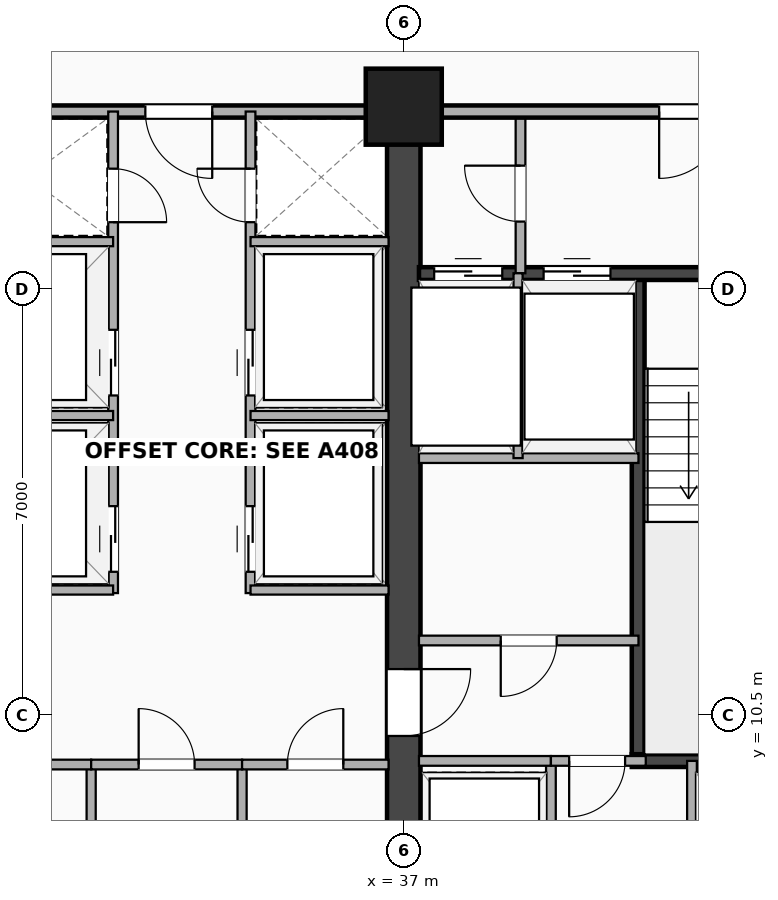
"""IFC4 building model, lengths in metres.
Left out: names, types, materials, properties, quantities, classifications, styles, units other than length and angle.
Written with IfcOpenShell. Run it as: python <this file> out.ifc"""

import sys

from ifc_helpers import new_model, si_unit, direction, frame, frame_2d, origin, origin_2d, place, context, subcontext, project, spatial, rectangle, extrude, element, fill, save


model = new_model("IFC4")
c1 = context("Model", 3, precision=1e-05, world=origin(), true_north=direction((0.0, 1.0)))
c2 = subcontext(c1, "Body", "Model", "MODEL_VIEW")
j1 = project(units=[si_unit("LENGTHUNIT", "METRE"), si_unit("PLANEANGLEUNIT", "RADIAN")], contexts=[c1])
p1 = place(None, origin())
s1 = spatial("IfcSite", under=j1, at=p1, CompositionType="ELEMENT")
p2 = place(p1, origin())
s2 = spatial("IfcBuilding", under=s1, at=p2, CompositionType="ELEMENT")
p3 = place(p2, frame((0.0, 0.0, 98.7)))
s3 = spatial("IfcBuildingStorey", under=s2, at=p3, CompositionType="ELEMENT", Elevation=98.7)
p4 = place(p3, frame((37.0, 3.5, 0.0), z_axis=(0.0, 0.0, 1.0), x_axis=(0.0, 1.0, 0.0)))
e1 = element("IfcWall", 1, at=p4, inside=s3, PredefinedType="SHEAR", context=c2, shape_type="SweptSolid", body=[
    extrude(rectangle(XDim=16.9, YDim=0.55, at=frame_2d((8.45, 0.0))), origin(), (0.0, 0.0, 1.0), 3.24),
])
p5 = place(p4, frame((6.65, 0.0, 0.0)))
e2 = element("IfcOpeningElement", 2, at=p5, cuts=e1, PredefinedType="OPENING", context=c2, shape_type="SweptSolid", body=[
    extrude(rectangle(XDim=1.1, YDim=2.15, at=frame_2d((0.55, 1.075))), frame((0.0, 0.285, 0.0), z_axis=(0.0, -1.0, 0.0), x_axis=(1.0, 0.0, 0.0)), (0.0, 0.0, 1.0), 0.57),
])
p6 = place(p3, frame((40.855, 9.745, 0.0), z_axis=(0.0, 0.0, 1.0), x_axis=(0.0, 1.0, 0.0)))
e3 = element("IfcWall", 3, at=p6, inside=s3, PredefinedType="SHEAR", context=c2, shape_type="SweptSolid", body=[
    extrude(rectangle(XDim=8.01, YDim=0.21, at=frame_2d((4.005, 0.0))), origin(), (0.0, 0.0, 1.0), 3.24),
])
p7 = place(p3, frame((40.75, 9.745, 0.0), z_axis=(0.0, 0.0, 1.0), x_axis=(1.0, 0.0, 0.0)))
e4 = element("IfcWall", 4, at=p7, inside=s3, PredefinedType="SHEAR", context=c2, shape_type="SweptSolid", body=[
    extrude(rectangle(XDim=3.66, YDim=0.21, at=frame_2d((1.83, 0.0))), origin(), (0.0, 0.0, 1.0), 3.24),
])
p8 = place(p3, frame((37.25, 17.755, 0.0), z_axis=(0.0, 0.0, 1.0), x_axis=(1.0, 0.0, 0.0)))
e5 = element("IfcWall", 5, at=p8, inside=s3, PredefinedType="SHEAR", context=c2, shape_type="SweptSolid", body=[
    extrude(rectangle(XDim=7.2, YDim=0.21, at=frame_2d((3.6, 0.0))), origin(), (0.0, 0.0, 1.0), 3.24),
])
p9 = place(p8, frame((0.25, 0.0, 0.0)))
e6 = element("IfcOpeningElement", 6, at=p9, cuts=e5, PredefinedType="OPENING", context=c2, shape_type="SweptSolid", body=[
    extrude(rectangle(XDim=1.12, YDim=2.2, at=frame_2d((0.56, 1.1))), frame((0.0, 0.115, 0.0), z_axis=(0.0, -1.0, 0.0), x_axis=(1.0, 0.0, 0.0)), (0.0, 0.0, 1.0), 0.23),
])
p10 = place(p8, frame((2.05, 0.0, 0.0)))
e7 = element("IfcOpeningElement", 7, at=p10, cuts=e5, PredefinedType="OPENING", context=c2, shape_type="SweptSolid", body=[
    extrude(rectangle(XDim=1.1, YDim=2.18, at=frame_2d((0.55, 1.09))), frame((0.0, 0.115, 0.0), z_axis=(0.0, -1.0, 0.0), x_axis=(1.0, 0.0, 0.0)), (0.0, 0.0, 1.0), 0.23),
])
p11 = place(p8, frame((5.78, 0.0, 0.0), z_axis=(0.0, 0.0, 1.0), x_axis=(-1.0, 0.0, 0.0)))
e8 = element("IfcOpeningElement", 8, at=p11, cuts=e5, PredefinedType="OPENING", context=c2, shape_type="SweptSolid", body=[
    extrude(rectangle(XDim=1.05, YDim=2.15, at=frame_2d((0.525, 1.075))), frame((0.0, 0.115, 0.0), z_axis=(0.0, -1.0, 0.0), x_axis=(1.0, 0.0, 0.0)), (0.0, 0.0, 1.0), 0.23),
])
p12 = place(p3, frame((37.0, 20.5, -0.26), z_axis=(0.0, 0.0, 1.0), x_axis=(1.0, 0.0, 0.0)))
e9 = element("IfcColumn", 9, at=p12, inside=s3, PredefinedType="COLUMN", context=c2, shape_type="SweptSolid", body=[
    extrude(rectangle(XDim=1.25, YDim=1.25, at=origin_2d()), origin(), (0.0, 0.0, 1.0), 3.5),
])
p13 = place(p3, frame((38.92, 17.76, 0.0), z_axis=(0.0, 0.0, 1.0), x_axis=(0.0, 1.0, 0.0)))
e10 = element("IfcWall", 10, at=p13, inside=s3, PredefinedType="PARTITIONING", context=c2, shape_type="SweptSolid", body=[
    extrude(rectangle(XDim=2.66, YDim=0.16, at=frame_2d((1.33, 0.0))), origin(), (0.0, 0.0, 1.0), 2.614),
])
p14 = place(p13, frame((1.77, 0.0, 0.0), z_axis=(0.0, 0.0, 1.0), x_axis=(-1.0, 0.0, 0.0)))
e11 = element("IfcOpeningElement", 11, at=p14, cuts=e10, PredefinedType="OPENING", context=c2, shape_type="SweptSolid", body=[
    extrude(rectangle(XDim=0.92, YDim=2.08, at=frame_2d((0.46, 1.04))), frame((0.0, 0.09, 0.0), z_axis=(0.0, -1.0, 0.0), x_axis=(1.0, 0.0, 0.0)), (0.0, 0.0, 1.0), 0.18),
])
p15 = place(p3, frame((37.25, 14.72, 0.0), z_axis=(0.0, 0.0, 1.0), x_axis=(1.0, 0.0, 0.0)))
e12 = element("IfcWall", 12, at=p15, inside=s3, PredefinedType="PARTITIONING", context=c2, shape_type="SweptSolid", body=[
    extrude(rectangle(XDim=3.61, YDim=0.16, at=frame_2d((1.805, 0.0))), origin(), (0.0, 0.0, 1.0), 3.24),
])
p16 = place(p3, frame((38.88, 14.72, 0.0), z_axis=(0.0, 0.0, 1.0), x_axis=(0.0, 1.0, 0.0)))
e13 = element("IfcWall", 13, at=p16, inside=s3, PredefinedType="PARTITIONING", context=c2, shape_type="SweptSolid", body=[
    extrude(rectangle(XDim=3.04, YDim=0.15, at=frame_2d((1.52, 0.0))), origin(), (0.0, 0.0, 1.0), 3.24),
])
p17 = place(p3, frame((29.2, 20.42, 0.0), z_axis=(0.0, 0.0, 1.0), x_axis=(1.0, 0.0, 0.0)))
e14 = element("IfcWall", 14, at=p17, inside=s3, PredefinedType="PARTITIONING", context=c2, shape_type="SweptSolid", body=[
    extrude(rectangle(XDim=7.8, YDim=0.2, at=frame_2d((3.9, 0.0))), origin(), (0.0, 0.0, 1.0), 2.313),
])
p18 = place(p17, frame((3.55, 0.0, 0.0)))
e15 = element("IfcOpeningElement", 15, at=p18, cuts=e14, PredefinedType="OPENING", context=c2, shape_type="SweptSolid", body=[
    extrude(rectangle(XDim=1.1, YDim=2.15, at=frame_2d((0.55, 1.075))), frame((0.0, 0.11, 0.0), z_axis=(0.0, -1.0, 0.0), x_axis=(1.0, 0.0, 0.0)), (0.0, 0.0, 1.0), 0.22),
])
p19 = place(p3, frame((37.0, 20.42, 0.0), z_axis=(0.0, 0.0, 1.0), x_axis=(1.0, 0.0, 0.0)))
e16 = element("IfcWall", 16, at=p19, inside=s3, PredefinedType="PARTITIONING", context=c2, shape_type="SweptSolid", body=[
    extrude(rectangle(XDim=7.45, YDim=0.2, at=frame_2d((3.725, 0.0))), origin(), (0.0, 0.0, 1.0), 2.313),
])
p20 = place(p19, frame((4.2, 0.0, 0.0)))
e17 = element("IfcOpeningElement", 17, at=p20, cuts=e16, PredefinedType="OPENING", context=c2, shape_type="SweptSolid", body=[
    extrude(rectangle(XDim=1.1, YDim=2.15, at=frame_2d((0.55, 1.075))), frame((0.0, 0.11, 0.0), z_axis=(0.0, -1.0, 0.0), x_axis=(1.0, 0.0, 0.0)), (0.0, 0.0, 1.0), 0.22),
])
p21 = place(p3, frame((37.25, 11.72, 0.0), z_axis=(0.0, 0.0, 1.0), x_axis=(1.0, 0.0, 0.0)))
e18 = element("IfcWall", 18, at=p21, inside=s3, PredefinedType="PARTITIONING", context=c2, shape_type="SweptSolid", body=[
    extrude(rectangle(XDim=3.61, YDim=0.16, at=frame_2d((1.805, 0.0))), origin(), (0.0, 0.0, 1.0), 3.24),
])
p22 = place(p21, frame((1.345, 0.0, 0.0)))
e19 = element("IfcOpeningElement", 19, at=p22, cuts=e18, PredefinedType="OPENING", context=c2, shape_type="SweptSolid", body=[
    extrude(rectangle(XDim=0.92, YDim=2.08, at=frame_2d((0.46, 1.04))), frame((0.0, 0.09, 0.0), z_axis=(0.0, -1.0, 0.0), x_axis=(1.0, 0.0, 0.0)), (0.0, 0.0, 1.0), 0.18),
])
for number, where, z_axis, x_axis in (
    (20, (39.42, 3.9, 0.0), (0.0, 0.0, 1.0), (0.0, 1.0, 0.0)),
    (21, (41.74, 3.9, 0.0), (0.0, 0.0, 1.0), (0.0, 1.0, 0.0)),
):
    element("IfcWall", number, at=place(p3, frame(where, z_axis=z_axis, x_axis=x_axis)), inside=s3, PredefinedType="PARTITIONING", context=c2, shape_type="SweptSolid", body=[
        extrude(rectangle(XDim=5.84, YDim=0.16, at=frame_2d((2.92, 0.0))), origin(), (0.0, 0.0, 1.0), 3.24),
    ])
p23 = place(p3, frame((37.25, 9.74, 0.0), z_axis=(0.0, 0.0, 1.0), x_axis=(1.0, 0.0, 0.0)))
e22 = element("IfcWall", 22, at=p23, inside=s3, PredefinedType="PARTITIONING", context=c2, shape_type="SweptSolid", body=[
    extrude(rectangle(XDim=2.17, YDim=0.16, at=frame_2d((1.085, 0.0))), origin(), (0.0, 0.0, 1.0), 3.24),
])
p24 = place(p3, frame((39.42, 9.74, 0.0), z_axis=(0.0, 0.0, 1.0), x_axis=(1.0, 0.0, 0.0)))
e23 = element("IfcWall", 23, at=p24, inside=s3, PredefinedType="PARTITIONING", context=c2, shape_type="SweptSolid", body=[
    extrude(rectangle(XDim=1.56, YDim=0.16, at=frame_2d((0.78, 0.0))), origin(), (0.0, 0.0, 1.0), 3.24),
])
p25 = place(p24, frame((0.3, 0.0, 0.0)))
e24 = element("IfcOpeningElement", 24, at=p25, cuts=e23, PredefinedType="OPENING", context=c2, shape_type="SweptSolid", body=[
    extrude(rectangle(XDim=0.92, YDim=2.08, at=frame_2d((0.46, 1.04))), frame((0.0, 0.09, 0.0), z_axis=(0.0, -1.0, 0.0), x_axis=(1.0, 0.0, 0.0)), (0.0, 0.0, 1.0), 0.18),
])
p26 = place(p3, frame((31.859, 3.95, 0.0), z_axis=(0.0, 0.0, 1.0), x_axis=(0.0, 1.0, 0.0)))
e25 = element("IfcWall", 25, at=p26, inside=s3, PredefinedType="PARTITIONING", context=c2, shape_type="SweptSolid", body=[
    extrude(rectangle(XDim=5.73, YDim=0.15, at=frame_2d((2.865, 0.0))), origin(), (0.0, 0.0, 1.0), 3.24),
])
p27 = place(p3, frame((29.45, 9.68, 0.0), z_axis=(0.0, 0.0, 1.0), x_axis=(1.0, 0.0, 0.0)))
e26 = element("IfcWall", 26, at=p27, inside=s3, PredefinedType="PARTITIONING", context=c2, shape_type="SweptSolid", body=[
    extrude(rectangle(XDim=2.409, YDim=0.16, at=frame_2d((1.205, 0.0))), origin(), (0.0, 0.0, 1.0), 3.24),
])
p28 = place(p27, frame((1.664, 0.0, 0.0), z_axis=(0.0, 0.0, 1.0), x_axis=(-1.0, 0.0, 0.0)))
e27 = element("IfcOpeningElement", 27, at=p28, cuts=e26, PredefinedType="OPENING", context=c2, shape_type="SweptSolid", body=[
    extrude(rectangle(XDim=0.92, YDim=2.08, at=frame_2d((0.46, 1.04))), frame((0.0, 0.09, 0.0), z_axis=(0.0, -1.0, 0.0), x_axis=(1.0, 0.0, 0.0)), (0.0, 0.0, 1.0), 0.18),
])
p29 = place(p3, frame((34.341, 3.95, 0.0), z_axis=(0.0, 0.0, 1.0), x_axis=(0.0, 1.0, 0.0)))
e28 = element("IfcWall", 28, at=p29, inside=s3, PredefinedType="PARTITIONING", context=c2, shape_type="SweptSolid", body=[
    extrude(rectangle(XDim=5.73, YDim=0.15, at=frame_2d((2.865, 0.0))), origin(), (0.0, 0.0, 1.0), 3.24),
])
p30 = place(p3, frame((31.859, 9.68, 0.0), z_axis=(0.0, 0.0, 1.0), x_axis=(1.0, 0.0, 0.0)))
e29 = element("IfcWall", 29, at=p30, inside=s3, PredefinedType="PARTITIONING", context=c2, shape_type="SweptSolid", body=[
    extrude(rectangle(XDim=2.482, YDim=0.16, at=frame_2d((1.241, 0.0))), origin(), (0.0, 0.0, 1.0), 3.24),
])
p31 = place(p30, frame((1.701, 0.0, 0.0), z_axis=(0.0, 0.0, 1.0), x_axis=(-1.0, 0.0, 0.0)))
e30 = element("IfcOpeningElement", 30, at=p31, cuts=e29, PredefinedType="OPENING", context=c2, shape_type="SweptSolid", body=[
    extrude(rectangle(XDim=0.92, YDim=2.08, at=frame_2d((0.46, 1.04))), frame((0.0, 0.09, 0.0), z_axis=(0.0, -1.0, 0.0), x_axis=(1.0, 0.0, 0.0)), (0.0, 0.0, 1.0), 0.18),
])
p32 = place(p3, frame((34.341, 9.68, 0.0), z_axis=(0.0, 0.0, 1.0), x_axis=(1.0, 0.0, 0.0)))
e31 = element("IfcWall", 31, at=p32, inside=s3, PredefinedType="PARTITIONING", context=c2, shape_type="SweptSolid", body=[
    extrude(rectangle(XDim=2.409, YDim=0.16, at=frame_2d((1.205, 0.0))), origin(), (0.0, 0.0, 1.0), 3.24),
])
p33 = place(p32, frame((1.664, 0.0, 0.0), z_axis=(0.0, 0.0, 1.0), x_axis=(-1.0, 0.0, 0.0)))
e32 = element("IfcOpeningElement", 32, at=p33, cuts=e31, PredefinedType="OPENING", context=c2, shape_type="SweptSolid", body=[
    extrude(rectangle(XDim=0.92, YDim=2.08, at=frame_2d((0.46, 1.04))), frame((0.0, 0.09, 0.0), z_axis=(0.0, -1.0, 0.0), x_axis=(1.0, 0.0, 0.0)), (0.0, 0.0, 1.0), 0.18),
])
p34 = place(p3, frame((32.22, 12.5, 0.0), z_axis=(0.0, 0.0, 1.0), x_axis=(0.0, 1.0, 0.0)))
e33 = element("IfcWall", 33, at=p34, inside=s3, PredefinedType="PARTITIONING", context=c2, shape_type="SweptSolid", body=[
    extrude(rectangle(XDim=7.92, YDim=0.16, at=frame_2d((3.96, 0.0))), origin(), (0.0, 0.0, 1.0), 2.614),
])
p35 = place(p34, frame((1.43, 0.0, 0.0), z_axis=(0.0, 0.0, 1.0), x_axis=(-1.0, 0.0, 0.0)))
e34 = element("IfcOpeningElement", 34, at=p35, cuts=e33, PredefinedType="OPENING", context=c2, shape_type="SweptSolid", body=[
    extrude(rectangle(XDim=1.08, YDim=2.16, at=frame_2d((0.54, 1.08))), frame((0.0, 0.09, 0.0), z_axis=(0.0, -1.0, 0.0), x_axis=(1.0, 0.0, 0.0)), (0.0, 0.0, 1.0), 0.18),
])
p36 = place(p34, frame((4.33, 0.0, 0.0), z_axis=(0.0, 0.0, 1.0), x_axis=(-1.0, 0.0, 0.0)))
e35 = element("IfcOpeningElement", 35, at=p36, cuts=e33, PredefinedType="OPENING", context=c2, shape_type="SweptSolid", body=[
    extrude(rectangle(XDim=1.08, YDim=2.16, at=frame_2d((0.54, 1.08))), frame((0.0, 0.09, 0.0), z_axis=(0.0, -1.0, 0.0), x_axis=(1.0, 0.0, 0.0)), (0.0, 0.0, 1.0), 0.18),
])
p37 = place(p34, frame((6.1, 0.0, 0.0)))
e36 = element("IfcOpeningElement", 36, at=p37, cuts=e33, PredefinedType="OPENING", context=c2, shape_type="SweptSolid", body=[
    extrude(rectangle(XDim=0.88, YDim=2.08, at=frame_2d((0.44, 1.04))), frame((0.0, 0.09, 0.0), z_axis=(0.0, -1.0, 0.0), x_axis=(1.0, 0.0, 0.0)), (0.0, 0.0, 1.0), 0.18),
])
p38 = place(p3, frame((34.48, 12.5, 0.0), z_axis=(0.0, 0.0, 1.0), x_axis=(0.0, 1.0, 0.0)))
e37 = element("IfcWall", 37, at=p38, inside=s3, PredefinedType="PARTITIONING", context=c2, shape_type="SweptSolid", body=[
    extrude(rectangle(XDim=7.92, YDim=0.16, at=frame_2d((3.96, 0.0))), origin(), (0.0, 0.0, 1.0), 2.614),
])
p39 = place(p38, frame((0.35, 0.0, 0.0)))
e38 = element("IfcOpeningElement", 38, at=p39, cuts=e37, PredefinedType="OPENING", context=c2, shape_type="SweptSolid", body=[
    extrude(rectangle(XDim=1.08, YDim=2.16, at=frame_2d((0.54, 1.08))), frame((0.0, 0.09, 0.0), z_axis=(0.0, -1.0, 0.0), x_axis=(1.0, 0.0, 0.0)), (0.0, 0.0, 1.0), 0.18),
])
p40 = place(p38, frame((3.25, 0.0, 0.0)))
e39 = element("IfcOpeningElement", 39, at=p40, cuts=e37, PredefinedType="OPENING", context=c2, shape_type="SweptSolid", body=[
    extrude(rectangle(XDim=1.08, YDim=2.16, at=frame_2d((0.54, 1.08))), frame((0.0, 0.09, 0.0), z_axis=(0.0, -1.0, 0.0), x_axis=(1.0, 0.0, 0.0)), (0.0, 0.0, 1.0), 0.18),
])
p41 = place(p38, frame((6.98, 0.0, 0.0), z_axis=(0.0, 0.0, 1.0), x_axis=(-1.0, 0.0, 0.0)))
e40 = element("IfcOpeningElement", 40, at=p41, cuts=e37, PredefinedType="OPENING", context=c2, shape_type="SweptSolid", body=[
    extrude(rectangle(XDim=0.88, YDim=2.08, at=frame_2d((0.44, 1.04))), frame((0.0, 0.09, 0.0), z_axis=(0.0, -1.0, 0.0), x_axis=(1.0, 0.0, 0.0)), (0.0, 0.0, 1.0), 0.18),
])
p42 = place(p3, frame((29.45, 12.55, 0.0), z_axis=(0.0, 0.0, 1.0), x_axis=(1.0, 0.0, 0.0)))
e41 = element("IfcWall", 41, at=p42, inside=s3, PredefinedType="PARTITIONING", context=c2, shape_type="SweptSolid", body=[
    extrude(rectangle(XDim=2.77, YDim=0.15, at=frame_2d((1.385, 0.0))), origin(), (0.0, 0.0, 1.0), 3.24),
])
p43 = place(p3, frame((34.48, 12.55, 0.0), z_axis=(0.0, 0.0, 1.0), x_axis=(1.0, 0.0, 0.0)))
e42 = element("IfcWall", 42, at=p43, inside=s3, PredefinedType="PARTITIONING", context=c2, shape_type="SweptSolid", body=[
    extrude(rectangle(XDim=2.27, YDim=0.15, at=frame_2d((1.135, 0.0))), origin(), (0.0, 0.0, 1.0), 3.24),
])
p44 = place(p3, frame((29.45, 15.42, 0.0), z_axis=(0.0, 0.0, 1.0), x_axis=(1.0, 0.0, 0.0)))
e43 = element("IfcWall", 43, at=p44, inside=s3, PredefinedType="PARTITIONING", context=c2, shape_type="SweptSolid", body=[
    extrude(rectangle(XDim=2.77, YDim=0.15, at=frame_2d((1.385, 0.0))), origin(), (0.0, 0.0, 1.0), 3.24),
])
p45 = place(p3, frame((34.48, 15.42, 0.0), z_axis=(0.0, 0.0, 1.0), x_axis=(1.0, 0.0, 0.0)))
e44 = element("IfcWall", 44, at=p45, inside=s3, PredefinedType="PARTITIONING", context=c2, shape_type="SweptSolid", body=[
    extrude(rectangle(XDim=2.27, YDim=0.15, at=frame_2d((1.135, 0.0))), origin(), (0.0, 0.0, 1.0), 3.24),
])
p46 = place(p3, frame((29.45, 18.28, 0.0), z_axis=(0.0, 0.0, 1.0), x_axis=(1.0, 0.0, 0.0)))
e45 = element("IfcWall", 45, at=p46, inside=s3, PredefinedType="PARTITIONING", context=c2, shape_type="SweptSolid", body=[
    extrude(rectangle(XDim=2.77, YDim=0.15, at=frame_2d((1.385, 0.0))), origin(), (0.0, 0.0, 1.0), 3.24),
])
p47 = place(p3, frame((34.48, 18.28, 0.0), z_axis=(0.0, 0.0, 1.0), x_axis=(1.0, 0.0, 0.0)))
e46 = element("IfcWall", 46, at=p47, inside=s3, PredefinedType="PARTITIONING", context=c2, shape_type="SweptSolid", body=[
    extrude(rectangle(XDim=2.27, YDim=0.15, at=frame_2d((1.135, 0.0))), origin(), (0.0, 0.0, 1.0), 3.24),
])
p48 = place(p9, origin())
e47 = element("IfcDoor", 47, at=p48, inside=s3, OperationType="DOUBLE_DOOR_SLIDING", PredefinedType="DOOR", context=c2, shape_type="SweptSolid", body=[
    extrude(rectangle(XDim=1.12, YDim=2.2, at=frame_2d((0.56, 1.1))), frame((0.0, 0.025, 0.0), z_axis=(0.0, -1.0, 0.0), x_axis=(1.0, 0.0, 0.0)), (0.0, 0.0, 1.0), 0.05),
])
fill(e6, e47)
p49 = place(p10, origin())
e48 = element("IfcDoor", 48, at=p49, inside=s3, OperationType="DOUBLE_DOOR_SLIDING", PredefinedType="DOOR", context=c2, shape_type="SweptSolid", body=[
    extrude(rectangle(XDim=1.1, YDim=2.18, at=frame_2d((0.55, 1.09))), frame((0.0, 0.025, 0.0), z_axis=(0.0, -1.0, 0.0), x_axis=(1.0, 0.0, 0.0)), (0.0, 0.0, 1.0), 0.05),
])
fill(e7, e48)
p50 = place(p5, origin())
e49 = element("IfcDoor", 49, at=p50, inside=s3, OperationType="SINGLE_SWING_RIGHT", PredefinedType="DOOR", context=c2, shape_type="SweptSolid", body=[
    extrude(rectangle(XDim=1.1, YDim=2.15, at=frame_2d((0.55, 1.075))), frame((0.0, 0.025, 0.0), z_axis=(0.0, -1.0, 0.0), x_axis=(1.0, 0.0, 0.0)), (0.0, 0.0, 1.0), 0.05),
])
fill(e2, e49)
p51 = place(p14, origin())
e50 = element("IfcDoor", 50, at=p51, inside=s3, OperationType="SINGLE_SWING_RIGHT", PredefinedType="DOOR", context=c2, shape_type="SweptSolid", body=[
    extrude(rectangle(XDim=0.92, YDim=2.08, at=frame_2d((0.46, 1.04))), frame((0.0, 0.025, 0.0), z_axis=(0.0, -1.0, 0.0), x_axis=(1.0, 0.0, 0.0)), (0.0, 0.0, 1.0), 0.05),
])
fill(e11, e50)
p52 = place(p18, origin())
e51 = element("IfcDoor", 51, at=p52, inside=s3, OperationType="SINGLE_SWING_RIGHT", PredefinedType="DOOR", context=c2, shape_type="SweptSolid", body=[
    extrude(rectangle(XDim=1.1, YDim=2.15, at=frame_2d((0.55, 1.075))), frame((0.0, 0.025, 0.0), z_axis=(0.0, -1.0, 0.0), x_axis=(1.0, 0.0, 0.0)), (0.0, 0.0, 1.0), 0.05),
])
fill(e15, e51)
p53 = place(p20, origin())
e52 = element("IfcDoor", 52, at=p53, inside=s3, OperationType="SINGLE_SWING_LEFT", PredefinedType="DOOR", context=c2, shape_type="SweptSolid", body=[
    extrude(rectangle(XDim=1.1, YDim=2.15, at=frame_2d((0.55, 1.075))), frame((0.0, 0.025, 0.0), z_axis=(0.0, -1.0, 0.0), x_axis=(1.0, 0.0, 0.0)), (0.0, 0.0, 1.0), 0.05),
])
fill(e17, e52)
p54 = place(p22, origin())
e53 = element("IfcDoor", 53, at=p54, inside=s3, OperationType="SINGLE_SWING_LEFT", PredefinedType="DOOR", context=c2, shape_type="SweptSolid", body=[
    extrude(rectangle(XDim=0.92, YDim=2.08, at=frame_2d((0.46, 1.04))), frame((0.0, 0.025, 0.0), z_axis=(0.0, -1.0, 0.0), x_axis=(1.0, 0.0, 0.0)), (0.0, 0.0, 1.0), 0.05),
])
fill(e19, e53)
p55 = place(p25, origin())
e54 = element("IfcDoor", 54, at=p55, inside=s3, OperationType="SINGLE_SWING_LEFT", PredefinedType="DOOR", context=c2, shape_type="SweptSolid", body=[
    extrude(rectangle(XDim=0.92, YDim=2.08, at=frame_2d((0.46, 1.04))), frame((0.0, 0.025, 0.0), z_axis=(0.0, -1.0, 0.0), x_axis=(1.0, 0.0, 0.0)), (0.0, 0.0, 1.0), 0.05),
])
fill(e24, e54)
p56 = place(p31, origin())
e55 = element("IfcDoor", 55, at=p56, inside=s3, OperationType="SINGLE_SWING_LEFT", PredefinedType="DOOR", context=c2, shape_type="SweptSolid", body=[
    extrude(rectangle(XDim=0.92, YDim=2.08, at=frame_2d((0.46, 1.04))), frame((0.0, 0.025, 0.0), z_axis=(0.0, -1.0, 0.0), x_axis=(1.0, 0.0, 0.0)), (0.0, 0.0, 1.0), 0.05),
])
fill(e30, e55)
p57 = place(p33, origin())
e56 = element("IfcDoor", 56, at=p57, inside=s3, OperationType="SINGLE_SWING_RIGHT", PredefinedType="DOOR", context=c2, shape_type="SweptSolid", body=[
    extrude(rectangle(XDim=0.92, YDim=2.08, at=frame_2d((0.46, 1.04))), frame((0.0, 0.025, 0.0), z_axis=(0.0, -1.0, 0.0), x_axis=(1.0, 0.0, 0.0)), (0.0, 0.0, 1.0), 0.05),
])
fill(e32, e56)
p58 = place(p35, origin())
e57 = element("IfcDoor", 57, at=p58, inside=s3, OperationType="DOUBLE_DOOR_SLIDING", PredefinedType="DOOR", context=c2, shape_type="SweptSolid", body=[
    extrude(rectangle(XDim=1.08, YDim=2.16, at=frame_2d((0.54, 1.08))), frame((0.0, 0.025, 0.0), z_axis=(0.0, -1.0, 0.0), x_axis=(1.0, 0.0, 0.0)), (0.0, 0.0, 1.0), 0.05),
])
fill(e34, e57)
p59 = place(p36, origin())
e58 = element("IfcDoor", 58, at=p59, inside=s3, OperationType="DOUBLE_DOOR_SLIDING", PredefinedType="DOOR", context=c2, shape_type="SweptSolid", body=[
    extrude(rectangle(XDim=1.08, YDim=2.16, at=frame_2d((0.54, 1.08))), frame((0.0, 0.025, 0.0), z_axis=(0.0, -1.0, 0.0), x_axis=(1.0, 0.0, 0.0)), (0.0, 0.0, 1.0), 0.05),
])
fill(e35, e58)
p60 = place(p37, origin())
e59 = element("IfcDoor", 59, at=p60, inside=s3, OperationType="SINGLE_SWING_LEFT", PredefinedType="DOOR", context=c2, shape_type="SweptSolid", body=[
    extrude(rectangle(XDim=0.88, YDim=2.08, at=frame_2d((0.44, 1.04))), frame((0.0, 0.025, 0.0), z_axis=(0.0, -1.0, 0.0), x_axis=(1.0, 0.0, 0.0)), (0.0, 0.0, 1.0), 0.05),
])
fill(e36, e59)
p61 = place(p39, origin())
e60 = element("IfcDoor", 60, at=p61, inside=s3, OperationType="DOUBLE_DOOR_SLIDING", PredefinedType="DOOR", context=c2, shape_type="SweptSolid", body=[
    extrude(rectangle(XDim=1.08, YDim=2.16, at=frame_2d((0.54, 1.08))), frame((0.0, 0.025, 0.0), z_axis=(0.0, -1.0, 0.0), x_axis=(1.0, 0.0, 0.0)), (0.0, 0.0, 1.0), 0.05),
])
fill(e38, e60)
p62 = place(p40, origin())
e61 = element("IfcDoor", 61, at=p62, inside=s3, OperationType="DOUBLE_DOOR_SLIDING", PredefinedType="DOOR", context=c2, shape_type="SweptSolid", body=[
    extrude(rectangle(XDim=1.08, YDim=2.16, at=frame_2d((0.54, 1.08))), frame((0.0, 0.025, 0.0), z_axis=(0.0, -1.0, 0.0), x_axis=(1.0, 0.0, 0.0)), (0.0, 0.0, 1.0), 0.05),
])
fill(e39, e61)
p63 = place(p41, origin())
e62 = element("IfcDoor", 62, at=p63, inside=s3, OperationType="SINGLE_SWING_RIGHT", PredefinedType="DOOR", context=c2, shape_type="SweptSolid", body=[
    extrude(rectangle(XDim=0.88, YDim=2.08, at=frame_2d((0.44, 1.04))), frame((0.0, 0.025, 0.0), z_axis=(0.0, -1.0, 0.0), x_axis=(1.0, 0.0, 0.0)), (0.0, 0.0, 1.0), 0.05),
])
fill(e40, e62)
save(model, sys.argv[1])
